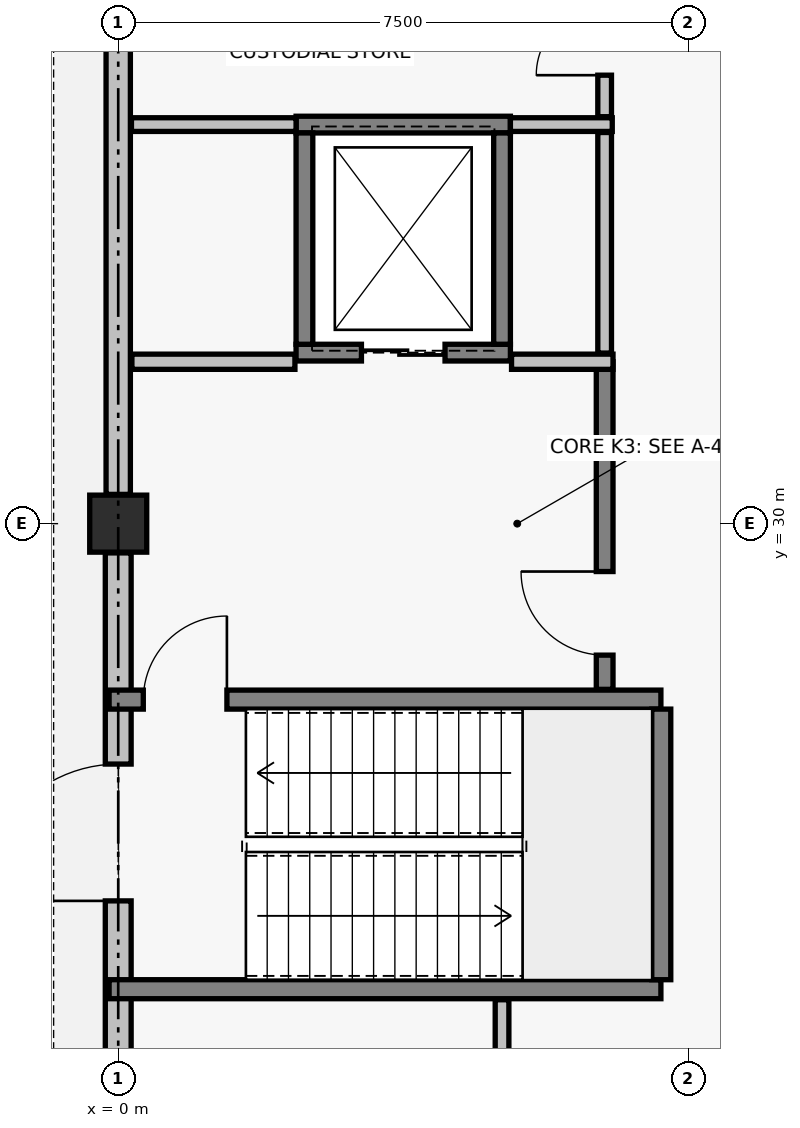
"""IFC4 building model, lengths in metres.
Left out: names, types, materials, properties, quantities, classifications, styles, units other than length and angle.
Written with IfcOpenShell. Run it as: python <this file> out.ifc"""

import sys

from ifc_helpers import new_model, si_unit, direction, frame, frame_2d, origin, origin_2d, place, context, subcontext, project, spatial, rectangle, circle, extrude, element, fill, save


model = new_model("IFC4")
c1 = context("Model", 3, precision=1e-05, world=origin(), true_north=direction((0.0, 1.0)))
c2 = subcontext(c1, "Body", "Model", "MODEL_VIEW")
j1 = project(units=[si_unit("LENGTHUNIT", "METRE"), si_unit("PLANEANGLEUNIT", "RADIAN")], contexts=[c1])
p1 = place(None, origin())
s1 = spatial("IfcSite", under=j1, at=p1, CompositionType="ELEMENT")
p2 = place(p1, origin())
s2 = spatial("IfcBuilding", under=s1, at=p2, CompositionType="ELEMENT")
p3 = place(p2, origin())
s3 = spatial("IfcBuildingStorey", under=s2, at=p3, CompositionType="ELEMENT", Elevation=0.0)
p4 = place(p3, frame((0.0, 30.0, 0.0), z_axis=(0.0, 0.0, 1.0), x_axis=(1.0, 0.0, 0.0)))
e1 = element("IfcColumn", 1, at=p4, inside=s3, PredefinedType="COLUMN", context=c2, shape_type="SweptSolid", body=[
    extrude(circle(Radius=0.375, at=origin_2d()), origin(), (0.0, 0.0, 1.0), 4.8),
])
p5 = place(p3, frame((0.0, 22.885, 0.0), z_axis=(0.0, 0.0, 1.0), x_axis=(0.0, 1.0, 0.0)))
e2 = element("IfcWall", 2, at=p5, inside=s3, PredefinedType="SOLIDWALL", context=c2, shape_type="SweptSolid", body=[
    extrude(rectangle(XDim=6.73, YDim=0.34, at=frame_2d((3.365, 0.0))), origin(), (0.0, 0.0, 1.0), 2.97),
])
p6 = place(p5, frame((2.152, 0.0, 0.0)))
e3 = element("IfcOpeningElement", 3, at=p6, cuts=e2, PredefinedType="OPENING", context=c2, shape_type="SweptSolid", body=[
    extrude(rectangle(XDim=1.8, YDim=2.2, at=frame_2d((0.9, 1.1))), frame((0.0, 0.18, 0.0), z_axis=(0.0, -1.0, 0.0), x_axis=(1.0, 0.0, 0.0)), (0.0, 0.0, 1.0), 0.36),
])
p7 = place(p3, frame((0.0, 30.385, 0.0), z_axis=(0.0, 0.0, 1.0), x_axis=(0.0, 1.0, 0.0)))
e4 = element("IfcWall", 4, at=p7, inside=s3, PredefinedType="SOLIDWALL", context=c2, shape_type="SweptSolid", body=[
    extrude(rectangle(XDim=6.73, YDim=0.32, at=frame_2d((3.365, 0.0))), origin(), (0.0, 0.0, 1.0), 2.97),
])
p8 = place(p3, frame((-0.12, 23.875, 0.0), z_axis=(0.0, 0.0, 1.0), x_axis=(1.0, 0.0, 0.0)))
e5 = element("IfcWall", 5, at=p8, inside=s3, PredefinedType="SOLIDWALL", context=c2, shape_type="SweptSolid", body=[
    extrude(rectangle(XDim=7.26, YDim=0.25, at=frame_2d((3.63, 0.0))), origin(), (0.0, 0.0, 1.0), 4.5),
])
p9 = place(p3, frame((-0.12, 27.685, 0.0), z_axis=(0.0, 0.0, 1.0), x_axis=(1.0, 0.0, 0.0)))
e6 = element("IfcWall", 6, at=p9, inside=s3, PredefinedType="SOLIDWALL", context=c2, shape_type="SweptSolid", body=[
    extrude(rectangle(XDim=7.26, YDim=0.25, at=frame_2d((3.63, 0.0))), origin(), (0.0, 0.0, 1.0), 4.5),
])
p10 = place(p9, frame((0.45, 0.0, 0.0)))
e7 = element("IfcOpeningElement", 7, at=p10, cuts=e6, PredefinedType="OPENING", context=c2, shape_type="SweptSolid", body=[
    extrude(rectangle(XDim=1.1, YDim=2.15, at=frame_2d((0.55, 1.075))), frame((0.0, 0.135, 0.0), z_axis=(0.0, -1.0, 0.0), x_axis=(1.0, 0.0, 0.0)), (0.0, 0.0, 1.0), 0.27),
])
p11 = place(p3, frame((7.145, 24.0, 0.0), z_axis=(0.0, 0.0, 1.0), x_axis=(0.0, 1.0, 0.0)))
e8 = element("IfcWall", 8, at=p11, inside=s3, PredefinedType="SOLIDWALL", context=c2, shape_type="SweptSolid", body=[
    extrude(rectangle(XDim=3.56, YDim=0.25, at=frame_2d((1.78, 0.0))), origin(), (0.0, 0.0, 1.0), 4.5),
])
p12 = place(p3, frame((2.34, 32.25, 0.0), z_axis=(0.0, 0.0, 1.0), x_axis=(1.0, 0.0, 0.0)))
e9 = element("IfcWall", 9, at=p12, inside=s3, PredefinedType="SOLIDWALL", context=c2, shape_type="SweptSolid", body=[
    extrude(rectangle(XDim=2.82, YDim=0.22, at=frame_2d((1.41, 0.0))), origin(), (0.0, 0.0, 1.0), 4.5),
])
p13 = place(p12, frame((0.86, 0.0, 0.0)))
e10 = element("IfcOpeningElement", 10, at=p13, cuts=e9, PredefinedType="OPENING", context=c2, shape_type="SweptSolid", body=[
    extrude(rectangle(XDim=1.1, YDim=2.15, at=frame_2d((0.55, 1.075))), frame((0.0, 0.12, 0.0), z_axis=(0.0, -1.0, 0.0), x_axis=(1.0, 0.0, 0.0)), (0.0, 0.0, 1.0), 0.24),
])
p14 = place(p3, frame((2.34, 35.25, 0.0), z_axis=(0.0, 0.0, 1.0), x_axis=(1.0, 0.0, 0.0)))
e11 = element("IfcWall", 11, at=p14, inside=s3, PredefinedType="SOLIDWALL", context=c2, shape_type="SweptSolid", body=[
    extrude(rectangle(XDim=2.82, YDim=0.22, at=frame_2d((1.41, 0.0))), origin(), (0.0, 0.0, 1.0), 4.5),
])
for number, where, z_axis, x_axis in (
    (12, (2.45, 32.36, 0.0), (0.0, 0.0, 1.0), (0.0, 1.0, 0.0)),
    (13, (5.05, 32.36, 0.0), (0.0, 0.0, 1.0), (0.0, 1.0, 0.0)),
):
    element("IfcWall", number, at=place(p3, frame(where, z_axis=z_axis, x_axis=x_axis)), inside=s3, PredefinedType="SOLIDWALL", context=c2, shape_type="SweptSolid", body=[
        extrude(rectangle(XDim=2.78, YDim=0.22, at=frame_2d((1.39, 0.0))), origin(), (0.0, 0.0, 1.0), 4.5),
    ])
p15 = place(p3, frame((6.4, 27.82, 0.0), z_axis=(0.0, 0.0, 1.0), x_axis=(0.0, 1.0, 0.0)))
e14 = element("IfcWall", 14, at=p15, inside=s3, PredefinedType="SOLIDWALL", context=c2, shape_type="SweptSolid", body=[
    extrude(rectangle(XDim=4.31, YDim=0.22, at=frame_2d((2.155, 0.0))), origin(), (0.0, 0.0, 1.0), 4.5),
])
p16 = place(p15, frame((0.45, 0.0, 0.0)))
e15 = element("IfcOpeningElement", 15, at=p16, cuts=e14, PredefinedType="OPENING", context=c2, shape_type="SweptSolid", body=[
    extrude(rectangle(XDim=1.1, YDim=2.15, at=frame_2d((0.55, 1.075))), frame((0.0, 0.12, 0.0), z_axis=(0.0, -1.0, 0.0), x_axis=(1.0, 0.0, 0.0)), (0.0, 0.0, 1.0), 0.24),
])
p17 = place(p3, frame((0.18, 32.13, 0.0), z_axis=(0.0, 0.0, 1.0), x_axis=(1.0, 0.0, 0.0)))
e16 = element("IfcWall", 16, at=p17, inside=s3, PredefinedType="PARTITIONING", context=c2, shape_type="SweptSolid", body=[
    extrude(rectangle(XDim=2.145, YDim=0.2, at=frame_2d((1.073, 0.0))), origin(), (0.0, 0.0, 1.0), 3.88),
])
p18 = place(p3, frame((5.175, 32.13, 0.0), z_axis=(0.0, 0.0, 1.0), x_axis=(1.0, 0.0, 0.0)))
e17 = element("IfcWall", 17, at=p18, inside=s3, PredefinedType="PARTITIONING", context=c2, shape_type="SweptSolid", body=[
    extrude(rectangle(XDim=1.335, YDim=0.2, at=frame_2d((0.667, 0.0))), origin(), (0.0, 0.0, 1.0), 3.93),
])
p19 = place(p3, frame((5.05, 20.274, 0.0), z_axis=(0.0, 0.0, 1.0), x_axis=(0.0, 1.0, 0.0)))
e18 = element("IfcWall", 18, at=p19, inside=s3, PredefinedType="PARTITIONING", context=c2, shape_type="SweptSolid", body=[
    extrude(rectangle(XDim=3.462, YDim=0.18, at=frame_2d((1.731, 0.0))), origin(), (0.0, 0.0, 1.0), 2.97),
])
p20 = place(p3, frame((0.174, 35.25, 0.0), z_axis=(0.0, 0.0, 1.0), x_axis=(1.0, 0.0, 0.0)))
e19 = element("IfcWall", 19, at=p20, inside=s3, PredefinedType="PARTITIONING", context=c2, shape_type="SweptSolid", body=[
    extrude(rectangle(XDim=2.166, YDim=0.18, at=frame_2d((1.083, 0.0))), origin(), (0.0, 0.0, 1.0), 3.87),
])
p21 = place(p3, frame((5.16, 35.25, 0.0), z_axis=(0.0, 0.0, 1.0), x_axis=(1.0, 0.0, 0.0)))
e20 = element("IfcWall", 20, at=p21, inside=s3, PredefinedType="PARTITIONING", context=c2, shape_type="SweptSolid", body=[
    extrude(rectangle(XDim=1.34, YDim=0.18, at=frame_2d((0.67, 0.0))), origin(), (0.0, 0.0, 1.0), 3.87),
])
p22 = place(p3, frame((6.4, 32.244, 0.0), z_axis=(0.0, 0.0, 1.0), x_axis=(0.0, 1.0, 0.0)))
e21 = element("IfcWall", 21, at=p22, inside=s3, PredefinedType="PARTITIONING", context=c2, shape_type="SweptSolid", body=[
    extrude(rectangle(XDim=2.902, YDim=0.18, at=frame_2d((1.451, 0.0))), origin(), (0.0, 0.0, 1.0), 3.87),
])
p23 = place(p3, frame((6.4, 35.354, 0.0), z_axis=(0.0, 0.0, 1.0), x_axis=(0.0, 1.0, 0.0)))
e22 = element("IfcWall", 22, at=p23, inside=s3, PredefinedType="PARTITIONING", context=c2, shape_type="SweptSolid", body=[
    extrude(rectangle(XDim=2.052, YDim=0.18, at=frame_2d((1.026, 0.0))), origin(), (0.0, 0.0, 1.0), 2.97),
])
p24 = place(p23, frame((0.546, 0.0, 0.0)))
e23 = element("IfcOpeningElement", 23, at=p24, cuts=e22, PredefinedType="OPENING", context=c2, shape_type="SweptSolid", body=[
    extrude(rectangle(XDim=0.9, YDim=2.1, at=frame_2d((0.45, 1.05))), frame((0.0, 0.1, 0.0), z_axis=(0.0, -1.0, 0.0), x_axis=(1.0, 0.0, 0.0)), (0.0, 0.0, 1.0), 0.2),
])
p25 = place(p6, origin())
e24 = element("IfcDoor", 24, at=p25, inside=s3, OperationType="SINGLE_SWING_LEFT", PredefinedType="DOOR", context=c2, shape_type="SweptSolid", body=[
    extrude(rectangle(XDim=1.8, YDim=2.2, at=frame_2d((0.9, 1.1))), frame((0.0, 0.025, 0.0), z_axis=(0.0, -1.0, 0.0), x_axis=(1.0, 0.0, 0.0)), (0.0, 0.0, 1.0), 0.05),
])
fill(e3, e24)
p26 = place(p10, origin())
e25 = element("IfcDoor", 25, at=p26, inside=s3, OperationType="SINGLE_SWING_RIGHT", PredefinedType="DOOR", context=c2, shape_type="SweptSolid", body=[
    extrude(rectangle(XDim=1.1, YDim=2.15, at=frame_2d((0.55, 1.075))), frame((0.0, 0.025, 0.0), z_axis=(0.0, -1.0, 0.0), x_axis=(1.0, 0.0, 0.0)), (0.0, 0.0, 1.0), 0.05),
])
fill(e7, e25)
p27 = place(p13, origin())
e26 = element("IfcDoor", 26, at=p27, inside=s3, OperationType="SLIDING_TO_LEFT", PredefinedType="DOOR", context=c2, shape_type="SweptSolid", body=[
    extrude(rectangle(XDim=1.1, YDim=2.15, at=frame_2d((0.55, 1.075))), frame((0.0, 0.025, 0.0), z_axis=(0.0, -1.0, 0.0), x_axis=(1.0, 0.0, 0.0)), (0.0, 0.0, 1.0), 0.05),
])
fill(e10, e26)
p28 = place(p16, origin())
e27 = element("IfcDoor", 27, at=p28, inside=s3, OperationType="SINGLE_SWING_RIGHT", PredefinedType="DOOR", context=c2, shape_type="SweptSolid", body=[
    extrude(rectangle(XDim=1.1, YDim=2.15, at=frame_2d((0.55, 1.075))), frame((0.0, 0.025, 0.0), z_axis=(0.0, -1.0, 0.0), x_axis=(1.0, 0.0, 0.0)), (0.0, 0.0, 1.0), 0.05),
])
fill(e15, e27)
p29 = place(p24, origin())
e28 = element("IfcDoor", 28, at=p29, inside=s3, OperationType="SINGLE_SWING_LEFT", PredefinedType="DOOR", context=c2, shape_type="SweptSolid", body=[
    extrude(rectangle(XDim=0.9, YDim=2.1, at=frame_2d((0.45, 1.05))), frame((0.0, 0.025, 0.0), z_axis=(0.0, -1.0, 0.0), x_axis=(1.0, 0.0, 0.0)), (0.0, 0.0, 1.0), 0.05),
])
fill(e23, e28)
save(model, sys.argv[1])
